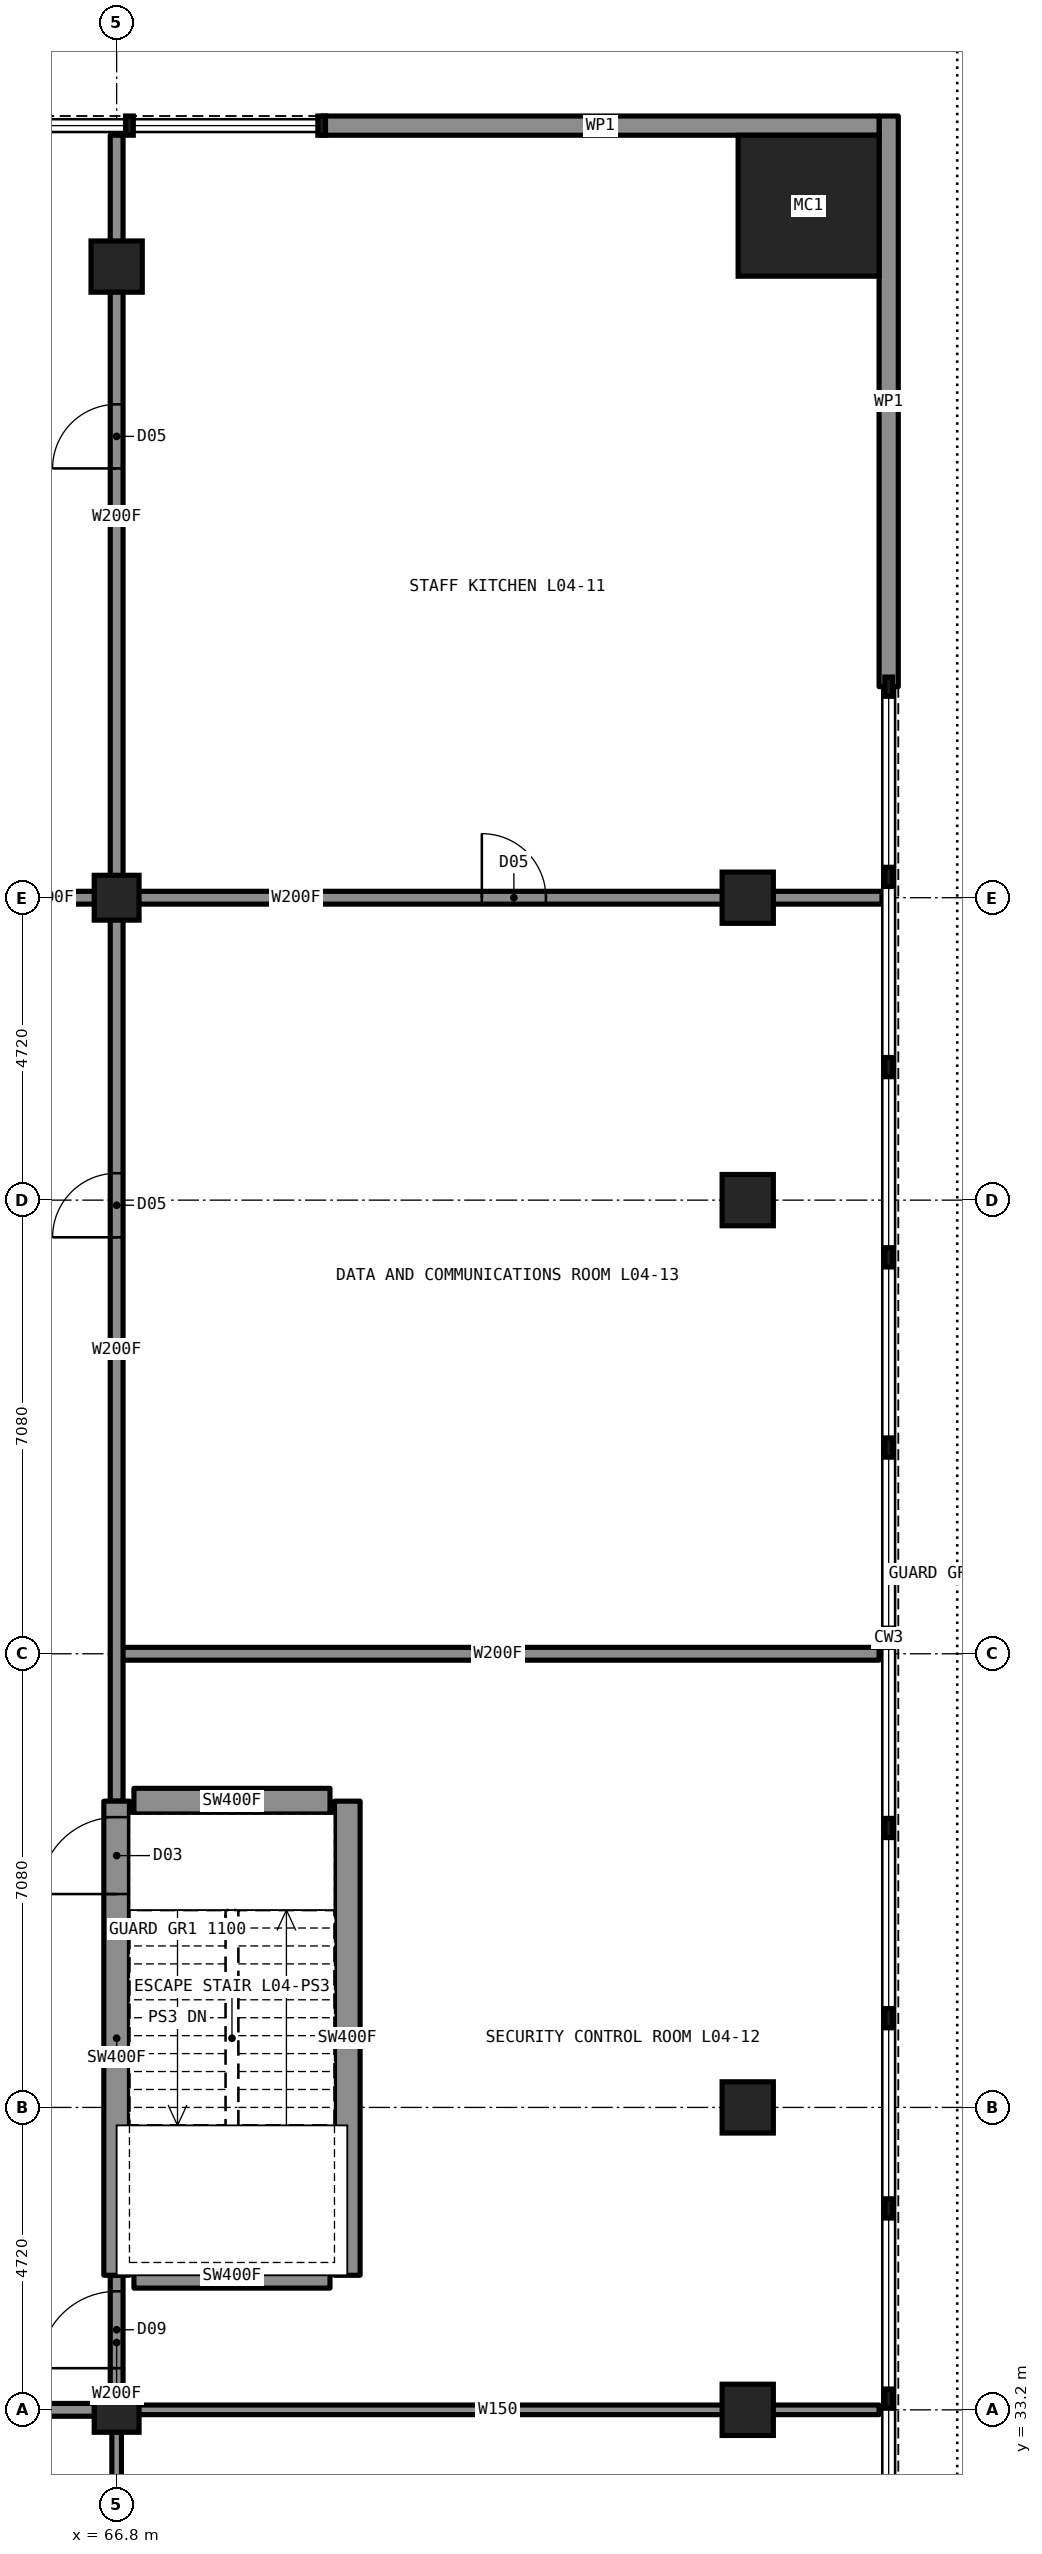
"""IFC4 building model, lengths in metres.
Left out: names, types, materials, properties, quantities, classifications, styles, units other than length and angle.
Written with IfcOpenShell. Run it as: python <this file> out.ifc"""

import sys

from ifc_helpers import new_model, si_unit, direction, frame, frame_2d, origin, origin_2d, place, context, subcontext, project, spatial, rectangle, hollow_rectangle, extrude, element, fill, save


model = new_model("IFC4")
c1 = context("Model", 3, precision=1e-05, world=origin(), true_north=direction((0.0, 1.0)))
c2 = subcontext(c1, "Body", "Model", "MODEL_VIEW")
j1 = project(units=[si_unit("LENGTHUNIT", "METRE"), si_unit("PLANEANGLEUNIT", "RADIAN")], contexts=[c1])
p1 = place(None, origin())
s1 = spatial("IfcSite", under=j1, at=p1, CompositionType="ELEMENT")
p2 = place(p1, origin())
s2 = spatial("IfcBuilding", under=s1, at=p2, CompositionType="ELEMENT")
p3 = place(p2, frame((0.0, 0.0, 20.5)))
s3 = spatial("IfcBuildingStorey", under=s2, at=p3, CompositionType="ELEMENT", Elevation=20.5)
for number, where, z_axis, x_axis in (
    (1, (66.8, 66.65, 0.0), (0.0, 0.0, 1.0), (1.0, 0.0, 0.0)),
    (2, (76.65, 33.2, 0.0), (0.0, 0.0, 1.0), (1.0, 0.0, 0.0)),
    (3, (76.65, 37.92, 0.0), (0.0, 0.0, 1.0), (1.0, 0.0, 0.0)),
    (4, (76.65, 52.08, 0.0), (0.0, 0.0, 1.0), (1.0, 0.0, 0.0)),
    (5, (76.65, 56.8, 0.0), (0.0, 0.0, 1.0), (1.0, 0.0, 0.0)),
):
    element("IfcColumn", number, at=place(p3, frame(where, z_axis=z_axis, x_axis=x_axis)), inside=s3, PredefinedType="COLUMN", context=c2, shape_type="SweptSolid", body=[
        extrude(hollow_rectangle(XDim=0.8, YDim=0.8, WallThickness=0.05, at=origin_2d()), origin(), (0.0, 0.0, 1.0), 4.5),
    ])
for number, where, z_axis, x_axis in (
    (6, (66.8, 33.2, 0.0), (0.0, 0.0, 1.0), (1.0, 0.0, 0.0)),
    (7, (66.8, 56.8, 0.0), (0.0, 0.0, 1.0), (1.0, 0.0, 0.0)),
):
    element("IfcColumn", number, at=place(p3, frame(where, z_axis=z_axis, x_axis=x_axis)), inside=s3, PredefinedType="COLUMN", context=c2, shape_type="SweptSolid", body=[
        extrude(hollow_rectangle(XDim=0.7, YDim=0.7, WallThickness=0.06, at=origin_2d()), origin(), (0.0, 0.0, 1.0), 4.5),
    ])
p4 = place(p3, frame((77.6, 67.6, 0.0), z_axis=(0.0, 0.0, 1.0), x_axis=(1.0, 0.0, 0.0)))
e8 = element("IfcColumn", 8, at=p4, inside=s3, PredefinedType="COLUMN", context=c2, shape_type="SweptSolid", body=[
    extrude(hollow_rectangle(XDim=2.2, YDim=2.2, WallThickness=0.15, at=origin_2d()), origin(), (0.0, 0.0, 1.0), 4.5),
])
p5 = place(p3, frame((52.7, 33.2, 0.0), z_axis=(0.0, 0.0, 1.0), x_axis=(1.0, 0.0, 0.0)))
e9 = element("IfcWall", 9, at=p5, inside=s3, PredefinedType="PARTITIONING", context=c2, shape_type="SweptSolid", body=[
    extrude(rectangle(XDim=14.1, YDim=0.2, at=frame_2d((7.05, 0.0))), origin(), (0.0, 0.0, 1.0), 4.33),
])
p6 = place(p5, frame((5.4, 0.0, 0.0)))
e10 = element("IfcOpeningElement", 10, at=p6, cuts=e9, PredefinedType="OPENING", context=c2, shape_type="SweptSolid", body=[
    extrude(rectangle(XDim=1.8, YDim=2.2, at=frame_2d((0.9, 1.1))), frame((0.0, 0.11, 0.0), z_axis=(0.0, -1.0, 0.0), x_axis=(1.0, 0.0, 0.0)), (0.0, 0.0, 1.0), 0.22),
])
p7 = place(p3, frame((66.8, 33.2, 0.0), z_axis=(0.0, 0.0, 1.0), x_axis=(1.0, 0.0, 0.0)))
e11 = element("IfcWall", 11, at=p7, inside=s3, PredefinedType="PARTITIONING", context=c2, shape_type="SweptSolid", body=[
    extrude(rectangle(XDim=11.9, YDim=0.15, at=frame_2d((5.95, 0.0))), origin(), (0.0, 0.0, 1.0), 3.13),
])
for number, where, z_axis, x_axis in (
    (12, (67.07, 42.7, 0.0), (0.0, 0.0, 1.0), (1.0, 0.0, 0.0)),
    (13, (67.07, 35.3, 0.0), (0.0, 0.0, 1.0), (1.0, 0.0, 0.0)),
):
    element("IfcWall", number, at=place(p3, frame(where, z_axis=z_axis, x_axis=x_axis)), inside=s3, PredefinedType="SHEAR", context=c2, shape_type="SweptSolid", body=[
        extrude(rectangle(XDim=3.06, YDim=0.4, at=frame_2d((1.53, 0.0))), origin(), (0.0, 0.0, 1.0), 4.5),
    ])
p8 = place(p3, frame((66.8, 45.0, 0.0), z_axis=(0.0, 0.0, 1.0), x_axis=(1.0, 0.0, 0.0)))
e14 = element("IfcWall", 14, at=p8, inside=s3, PredefinedType="PARTITIONING", context=c2, shape_type="SweptSolid", body=[
    extrude(rectangle(XDim=11.9, YDim=0.2, at=frame_2d((5.95, 0.0))), origin(), (0.0, 0.0, 1.0), 3.13),
])
p9 = place(p3, frame((64.7, 56.8, 0.0), z_axis=(0.0, 0.0, 1.0), x_axis=(1.0, 0.0, 0.0)))
e15 = element("IfcWall", 15, at=p9, inside=s3, PredefinedType="PARTITIONING", context=c2, shape_type="SweptSolid", body=[
    extrude(rectangle(XDim=2.1, YDim=0.2, at=frame_2d((1.05, 0.0))), origin(), (0.0, 0.0, 1.0), 4.33),
])
p10 = place(p3, frame((66.8, 56.8, 0.0), z_axis=(0.0, 0.0, 1.0), x_axis=(1.0, 0.0, 0.0)))
e16 = element("IfcWall", 16, at=p10, inside=s3, PredefinedType="PARTITIONING", context=c2, shape_type="SweptSolid", body=[
    extrude(rectangle(XDim=11.945, YDim=0.2, at=frame_2d((5.973, 0.0))), origin(), (0.0, 0.0, 1.0), 3.13),
])
p11 = place(p10, frame((5.7, 0.0, 0.0)))
e17 = element("IfcOpeningElement", 17, at=p11, cuts=e16, PredefinedType="OPENING", context=c2, shape_type="SweptSolid", body=[
    extrude(rectangle(XDim=1.0, YDim=2.1, at=frame_2d((0.5, 1.05))), frame((0.0, 0.11, 0.0), z_axis=(0.0, -1.0, 0.0), x_axis=(1.0, 0.0, 0.0)), (0.0, 0.0, 1.0), 0.22),
])
p12 = place(p3, frame((66.8, 33.2, 0.0), z_axis=(0.0, 0.0, 1.0), x_axis=(0.0, 1.0, 0.0)))
e18 = element("IfcWall", 18, at=p12, inside=s3, PredefinedType="PARTITIONING", context=c2, shape_type="SweptSolid", body=[
    extrude(rectangle(XDim=2.1, YDim=0.2, at=frame_2d((1.05, 0.0))), origin(), (0.0, 0.0, 1.0), 4.33),
])
p13 = place(p12, frame((0.65, 0.0, 0.0)))
e19 = element("IfcOpeningElement", 19, at=p13, cuts=e18, PredefinedType="OPENING", context=c2, shape_type="SweptSolid", body=[
    extrude(rectangle(XDim=1.2, YDim=2.2, at=frame_2d((0.6, 1.1))), frame((0.0, 0.11, 0.0), z_axis=(0.0, -1.0, 0.0), x_axis=(1.0, 0.0, 0.0)), (0.0, 0.0, 1.0), 0.22),
])
p14 = place(p3, frame((66.8, 42.7, 0.0), z_axis=(0.0, 0.0, 1.0), x_axis=(0.0, 1.0, 0.0)))
e20 = element("IfcWall", 20, at=p14, inside=s3, PredefinedType="PARTITIONING", context=c2, shape_type="SweptSolid", body=[
    extrude(rectangle(XDim=14.1, YDim=0.2, at=frame_2d((7.05, 0.0))), origin(), (0.0, 0.0, 1.0), 4.33),
])
p15 = place(p14, frame((8.8, 0.0, 0.0)))
e21 = element("IfcOpeningElement", 21, at=p15, cuts=e20, PredefinedType="OPENING", context=c2, shape_type="SweptSolid", body=[
    extrude(rectangle(XDim=1.0, YDim=2.1, at=frame_2d((0.5, 1.05))), frame((0.0, 0.11, 0.0), z_axis=(0.0, -1.0, 0.0), x_axis=(1.0, 0.0, 0.0)), (0.0, 0.0, 1.0), 0.22),
])
p16 = place(p3, frame((66.8, 56.8, 0.0), z_axis=(0.0, 0.0, 1.0), x_axis=(0.0, 1.0, 0.0)))
e22 = element("IfcWall", 22, at=p16, inside=s3, PredefinedType="PARTITIONING", context=c2, shape_type="SweptSolid", body=[
    extrude(rectangle(XDim=11.9, YDim=0.2, at=frame_2d((5.95, 0.0))), origin(), (0.0, 0.0, 1.0), 3.13),
])
p17 = place(p16, frame((6.7, 0.0, 0.0)))
e23 = element("IfcOpeningElement", 23, at=p17, cuts=e22, PredefinedType="OPENING", context=c2, shape_type="SweptSolid", body=[
    extrude(rectangle(XDim=1.0, YDim=2.1, at=frame_2d((0.5, 1.05))), frame((0.0, 0.11, 0.0), z_axis=(0.0, -1.0, 0.0), x_axis=(1.0, 0.0, 0.0)), (0.0, 0.0, 1.0), 0.22),
])
p18 = place(p3, frame((66.8, 21.755, 0.0), z_axis=(0.0, 0.0, 1.0), x_axis=(0.0, 1.0, 0.0)))
e24 = element("IfcWall", 24, at=p18, inside=s3, PredefinedType="PARTITIONING", context=c2, shape_type="SweptSolid", body=[
    extrude(rectangle(XDim=11.445, YDim=0.15, at=frame_2d((5.723, 0.0))), origin(), (0.0, 0.0, 1.0), 3.13),
])
p19 = place(p18, frame((4.645, 0.0, 0.0)))
e25 = element("IfcOpeningElement", 25, at=p19, cuts=e24, PredefinedType="OPENING", context=c2, shape_type="SweptSolid", body=[
    extrude(rectangle(XDim=1.2, YDim=2.2, at=frame_2d((0.6, 1.1))), frame((0.0, 0.085, 0.0), z_axis=(0.0, -1.0, 0.0), x_axis=(1.0, 0.0, 0.0)), (0.0, 0.0, 1.0), 0.17),
])
p20 = place(p3, frame((66.8, 35.3, 0.0), z_axis=(0.0, 0.0, 1.0), x_axis=(0.0, 1.0, 0.0)))
e26 = element("IfcWall", 26, at=p20, inside=s3, PredefinedType="SHEAR", context=c2, shape_type="SweptSolid", body=[
    extrude(rectangle(XDim=7.4, YDim=0.4, at=frame_2d((3.7, 0.0))), origin(), (0.0, 0.0, 1.0), 4.5),
])
p21 = place(p20, frame((5.95, 0.0, 0.0)))
e27 = element("IfcOpeningElement", 27, at=p21, cuts=e26, PredefinedType="OPENING", context=c2, shape_type="SweptSolid", body=[
    extrude(rectangle(XDim=1.2, YDim=2.2, at=frame_2d((0.6, 1.1))), frame((0.0, 0.21, 0.0), z_axis=(0.0, -1.0, 0.0), x_axis=(1.0, 0.0, 0.0)), (0.0, 0.0, 1.0), 0.42),
])
p22 = place(p3, frame((70.4, 35.3, 0.0), z_axis=(0.0, 0.0, 1.0), x_axis=(0.0, 1.0, 0.0)))
e28 = element("IfcWall", 28, at=p22, inside=s3, PredefinedType="SHEAR", context=c2, shape_type="SweptSolid", body=[
    extrude(rectangle(XDim=7.4, YDim=0.4, at=frame_2d((3.7, 0.0))), origin(), (0.0, 0.0, 1.0), 4.5),
])
p23 = place(p3, frame((78.85, 60.094, 0.0), z_axis=(0.0, 0.0, 1.0), x_axis=(0.0, 1.0, 0.0)))
e29 = element("IfcWall", 29, at=p23, inside=s3, PredefinedType="SOLIDWALL", context=c2, shape_type="SweptSolid", body=[
    extrude(rectangle(XDim=8.906, YDim=0.3, at=frame_2d((4.453, 0.0))), origin(), (0.0, 0.0, 1.0), 4.33),
])
p24 = place(p3, frame((78.7, 68.85, 0.0), z_axis=(0.0, 0.0, 1.0), x_axis=(-1.0, 0.0, 0.0)))
e30 = element("IfcWall", 30, at=p24, inside=s3, PredefinedType="SOLIDWALL", context=c2, shape_type="SweptSolid", body=[
    extrude(rectangle(XDim=8.7, YDim=0.3, at=frame_2d((4.35, 0.0))), origin(), (0.0, 0.0, 1.0), 4.33),
])
p25 = place(p21, origin())
e31 = element("IfcDoor", 31, at=p25, inside=s3, OperationType="SINGLE_SWING_LEFT", PredefinedType="DOOR", context=c2, shape_type="SweptSolid", body=[
    extrude(rectangle(XDim=1.2, YDim=2.2, at=frame_2d((0.6, 1.1))), frame((0.0, 0.025, 0.0), z_axis=(0.0, -1.0, 0.0), x_axis=(1.0, 0.0, 0.0)), (0.0, 0.0, 1.0), 0.05),
])
fill(e27, e31)
p26 = place(p17, origin())
e32 = element("IfcDoor", 32, at=p26, inside=s3, OperationType="SINGLE_SWING_LEFT", PredefinedType="DOOR", context=c2, shape_type="SweptSolid", body=[
    extrude(rectangle(XDim=1.0, YDim=2.1, at=frame_2d((0.5, 1.05))), frame((0.0, 0.025, 0.0), z_axis=(0.0, -1.0, 0.0), x_axis=(1.0, 0.0, 0.0)), (0.0, 0.0, 1.0), 0.05),
])
fill(e23, e32)
p27 = place(p11, origin())
e33 = element("IfcDoor", 33, at=p27, inside=s3, OperationType="SINGLE_SWING_LEFT", PredefinedType="DOOR", context=c2, shape_type="SweptSolid", body=[
    extrude(rectangle(XDim=1.0, YDim=2.1, at=frame_2d((0.5, 1.05))), frame((0.0, 0.025, 0.0), z_axis=(0.0, -1.0, 0.0), x_axis=(1.0, 0.0, 0.0)), (0.0, 0.0, 1.0), 0.05),
])
fill(e17, e33)
p28 = place(p13, origin())
e34 = element("IfcDoor", 34, at=p28, inside=s3, OperationType="SINGLE_SWING_LEFT", PredefinedType="DOOR", context=c2, shape_type="SweptSolid", body=[
    extrude(rectangle(XDim=1.2, YDim=2.2, at=frame_2d((0.6, 1.1))), frame((0.0, 0.025, 0.0), z_axis=(0.0, -1.0, 0.0), x_axis=(1.0, 0.0, 0.0)), (0.0, 0.0, 1.0), 0.05),
])
fill(e19, e34)
p29 = place(p15, origin())
e35 = element("IfcDoor", 35, at=p29, inside=s3, OperationType="SINGLE_SWING_LEFT", PredefinedType="DOOR", context=c2, shape_type="SweptSolid", body=[
    extrude(rectangle(XDim=1.0, YDim=2.1, at=frame_2d((0.5, 1.05))), frame((0.0, 0.025, 0.0), z_axis=(0.0, -1.0, 0.0), x_axis=(1.0, 0.0, 0.0)), (0.0, 0.0, 1.0), 0.05),
])
fill(e21, e35)
save(model, sys.argv[1])
